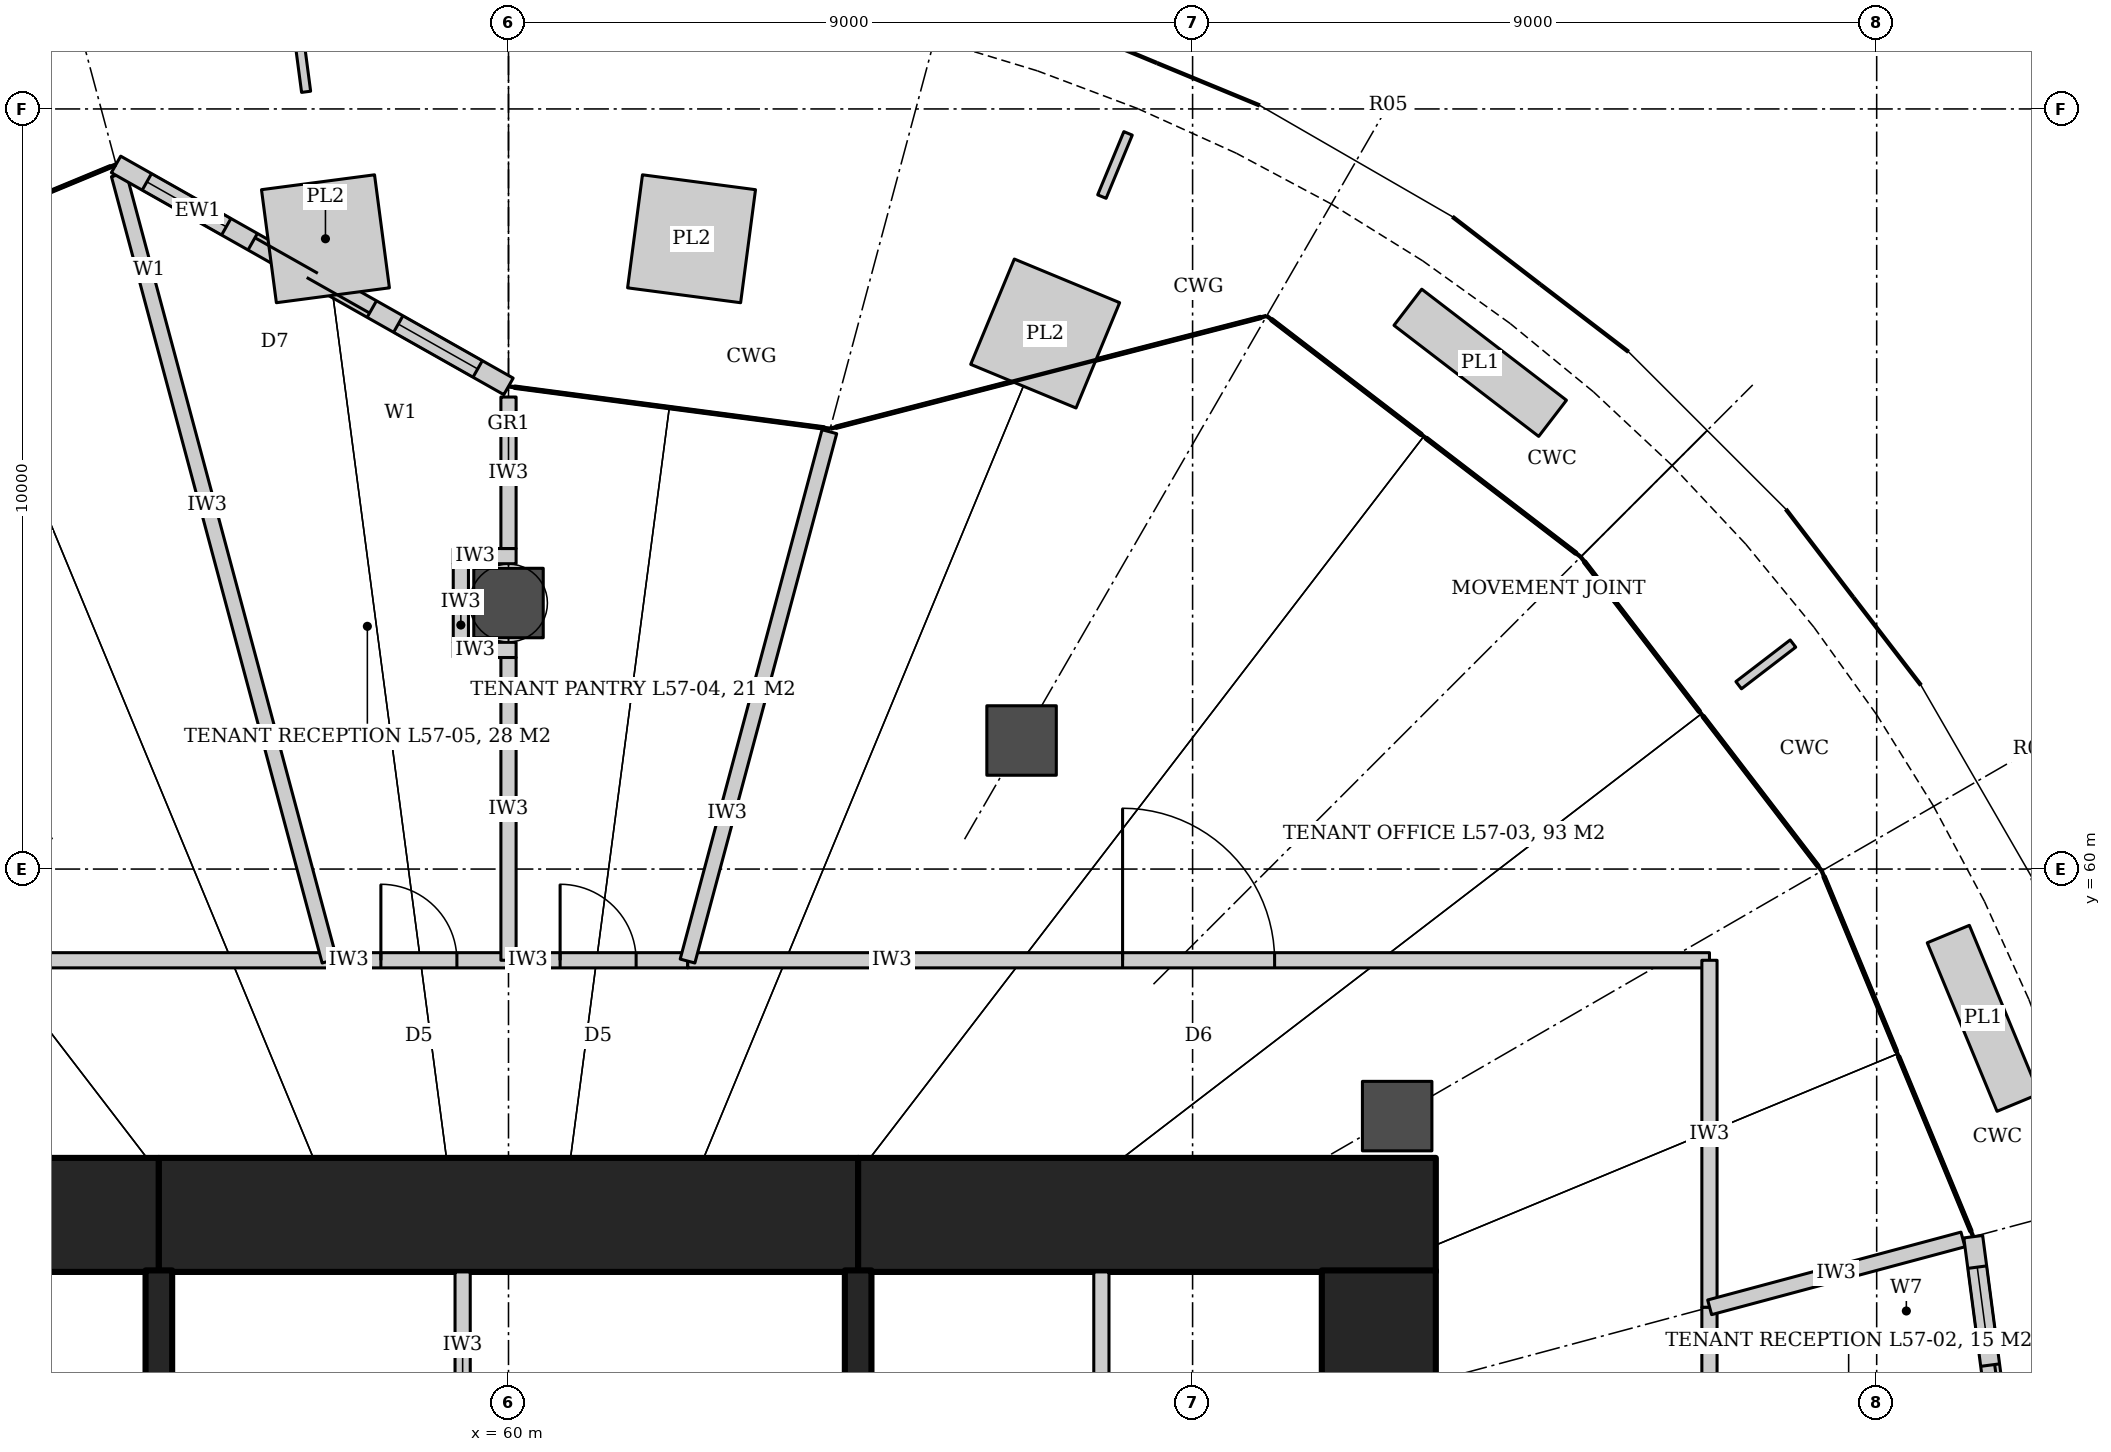
"""IFC4 building model, lengths in metres.
Left out: names, types, materials, properties, quantities, classifications, styles, units other than length and angle.
Written with IfcOpenShell. Run it as: python <this file> out.ifc"""

import sys

from ifc_helpers import new_model, si_unit, direction, frame, frame_2d, origin, origin_2d, place, context, subcontext, project, spatial, rectangle, hollow_circle, extrude, element, fill, save


model = new_model("IFC4")
c1 = context("Model", 3, precision=1e-05, world=origin(), true_north=direction((0.0, 1.0)))
c2 = subcontext(c1, "Body", "Model", "MODEL_VIEW")
j1 = project(units=[si_unit("LENGTHUNIT", "METRE"), si_unit("PLANEANGLEUNIT", "RADIAN")], contexts=[c1])
p1 = place(None, origin())
s1 = spatial("IfcSite", under=j1, at=p1, CompositionType="ELEMENT")
p2 = place(p1, origin())
s2 = spatial("IfcBuilding", under=s1, at=p2, CompositionType="ELEMENT")
p3 = place(p2, frame((0.0, 0.0, 240.2)))
s3 = spatial("IfcBuildingStorey", under=s2, at=p3, CompositionType="ELEMENT", Elevation=240.2)
p4 = place(p3, frame((47.8, 55.45, 0.0), z_axis=(0.0, 0.0, 1.0), x_axis=(1.0, 0.0, 0.0)))
e1 = element("IfcWall", 1, at=p4, inside=s3, PredefinedType="SHEAR", context=c2, shape_type="SweptSolid", body=[
    extrude(rectangle(XDim=7.6, YDim=1.5, at=frame_2d((3.8, 0.0))), origin(), (0.0, 0.0, 1.0), 4.2),
])
p5 = place(p3, frame((55.4, 55.45, 0.0), z_axis=(0.0, 0.0, 1.0), x_axis=(1.0, 0.0, 0.0)))
e2 = element("IfcWall", 2, at=p5, inside=s3, PredefinedType="SHEAR", context=c2, shape_type="SweptSolid", body=[
    extrude(rectangle(XDim=9.2, YDim=1.5, at=frame_2d((4.6, 0.0))), origin(), (0.0, 0.0, 1.0), 4.2),
])
p6 = place(p3, frame((64.6, 55.45, 0.0), z_axis=(0.0, 0.0, 1.0), x_axis=(1.0, 0.0, 0.0)))
e3 = element("IfcWall", 3, at=p6, inside=s3, PredefinedType="SHEAR", context=c2, shape_type="SweptSolid", body=[
    extrude(rectangle(XDim=7.6, YDim=1.5, at=frame_2d((3.8, 0.0))), origin(), (0.0, 0.0, 1.0), 4.2),
])
p7 = place(p3, frame((71.45, 51.5, 0.0), z_axis=(0.0, 0.0, 1.0), x_axis=(0.0, 1.0, 0.0)))
e4 = element("IfcWall", 4, at=p7, inside=s3, PredefinedType="SHEAR", context=c2, shape_type="SweptSolid", body=[
    extrude(rectangle(XDim=3.22, YDim=1.5, at=frame_2d((1.61, 0.0))), origin(), (0.0, 0.0, 1.0), 4.2),
])
for number, where, z_axis, x_axis in (
    (5, (55.4, 51.655, 0.0), (0.0, 0.0, 1.0), (0.0, 1.0, 0.0)),
    (6, (64.6, 51.655, 0.0), (0.0, 0.0, 1.0), (0.0, 1.0, 0.0)),
):
    element("IfcWall", number, at=place(p3, frame(where, z_axis=z_axis, x_axis=x_axis)), inside=s3, PredefinedType="SHEAR", context=c2, shape_type="SweptSolid", body=[
        extrude(rectangle(XDim=3.065, YDim=0.35, at=frame_2d((1.532, 0.0))), origin(), (0.0, 0.0, 1.0), 4.2),
    ])
for number, where, z_axis, x_axis in (
    (7, (71.691, 56.75, 0.0), (0.0, 0.0, 1.0), (1.0, 0.0, 0.0)),
    (8, (66.75, 61.691, 0.0), (0.0, 0.0, 1.0), (1.0, 0.0, 0.0)),
    (9, (60.0, 63.5, 0.0), (0.0, 0.0, 1.0), (1.0, 0.0, 0.0)),
):
    element("IfcColumn", number, at=place(p3, frame(where, z_axis=z_axis, x_axis=x_axis)), inside=s3, PredefinedType="COLUMN", context=c2, shape_type="SweptSolid", body=[
        extrude(hollow_circle(Radius=0.457, WallThickness=0.045, at=origin_2d()), origin(), (0.0, 0.0, 1.0), 4.2),
    ])
p8 = place(p3, frame((44.2, 58.8, 0.0), z_axis=(0.0, 0.0, 1.0), x_axis=(1.0, 0.0, 0.0)))
e10 = element("IfcWall", 10, at=p8, inside=s3, PredefinedType="PARTITIONING", context=c2, shape_type="SweptSolid", body=[
    extrude(rectangle(XDim=13.442, YDim=0.2, at=frame_2d((6.721, 0.0))), origin(), (0.0, 0.0, 1.0), 3.02),
])
p9 = place(p8, frame((5.721, 0.0, 0.0)))
e11 = element("IfcOpeningElement", 11, at=p9, cuts=e10, PredefinedType="OPENING", context=c2, shape_type="SweptSolid", body=[
    extrude(rectangle(XDim=2.0, YDim=2.1, at=frame_2d((1.0, 1.05))), frame((0.0, 0.11, 0.0), z_axis=(0.0, -1.0, 0.0), x_axis=(1.0, 0.0, 0.0)), (0.0, 0.0, 1.0), 0.22),
])
p10 = place(p3, frame((57.642, 58.8, 0.0), z_axis=(0.0, 0.0, 1.0), x_axis=(1.0, 0.0, 0.0)))
e12 = element("IfcWall", 12, at=p10, inside=s3, PredefinedType="PARTITIONING", context=c2, shape_type="SweptSolid", body=[
    extrude(rectangle(XDim=2.358, YDim=0.2, at=frame_2d((1.179, 0.0))), origin(), (0.0, 0.0, 1.0), 3.04),
])
p11 = place(p10, frame((0.679, 0.0, 0.0)))
e13 = element("IfcOpeningElement", 13, at=p11, cuts=e12, PredefinedType="OPENING", context=c2, shape_type="SweptSolid", body=[
    extrude(rectangle(XDim=1.0, YDim=2.1, at=frame_2d((0.5, 1.05))), frame((0.0, 0.11, 0.0), z_axis=(0.0, -1.0, 0.0), x_axis=(1.0, 0.0, 0.0)), (0.0, 0.0, 1.0), 0.22),
])
p12 = place(p3, frame((60.0, 58.8, 0.0), z_axis=(0.0, 0.0, 1.0), x_axis=(1.0, 0.0, 0.0)))
e14 = element("IfcWall", 14, at=p12, inside=s3, PredefinedType="PARTITIONING", context=c2, shape_type="SweptSolid", body=[
    extrude(rectangle(XDim=2.358, YDim=0.2, at=frame_2d((1.179, 0.0))), origin(), (0.0, 0.0, 1.0), 3.04),
])
p13 = place(p12, frame((0.679, 0.0, 0.0)))
e15 = element("IfcOpeningElement", 15, at=p13, cuts=e14, PredefinedType="OPENING", context=c2, shape_type="SweptSolid", body=[
    extrude(rectangle(XDim=1.0, YDim=2.1, at=frame_2d((0.5, 1.05))), frame((0.0, 0.11, 0.0), z_axis=(0.0, -1.0, 0.0), x_axis=(1.0, 0.0, 0.0)), (0.0, 0.0, 1.0), 0.22),
])
p14 = place(p3, frame((62.358, 58.8, 0.0), z_axis=(0.0, 0.0, 1.0), x_axis=(1.0, 0.0, 0.0)))
e16 = element("IfcWall", 16, at=p14, inside=s3, PredefinedType="PARTITIONING", context=c2, shape_type="SweptSolid", body=[
    extrude(rectangle(XDim=13.442, YDim=0.2, at=frame_2d((6.721, 0.0))), origin(), (0.0, 0.0, 1.0), 3.02),
])
p15 = place(p14, frame((5.721, 0.0, 0.0)))
e17 = element("IfcOpeningElement", 17, at=p15, cuts=e16, PredefinedType="OPENING", context=c2, shape_type="SweptSolid", body=[
    extrude(rectangle(XDim=2.0, YDim=2.1, at=frame_2d((1.0, 1.05))), frame((0.0, 0.11, 0.0), z_axis=(0.0, -1.0, 0.0), x_axis=(1.0, 0.0, 0.0)), (0.0, 0.0, 1.0), 0.22),
])
p16 = place(p3, frame((75.8, 58.8, 0.0), z_axis=(0.0, 0.0, 1.0), x_axis=(0.0, -1.0, 0.0)))
e18 = element("IfcWall", 18, at=p16, inside=s3, PredefinedType="PARTITIONING", context=c2, shape_type="SweptSolid", body=[
    extrude(rectangle(XDim=4.566, YDim=0.2, at=frame_2d((2.283, 0.0))), origin(), (0.0, 0.0, 1.0), 3.02),
])
p17 = place(p3, frame((75.8, 54.234, 0.0), z_axis=(0.0, 0.0, 1.0), x_axis=(0.0, -1.0, 0.0)))
e19 = element("IfcWall", 19, at=p17, inside=s3, PredefinedType="PARTITIONING", context=c2, shape_type="SweptSolid", body=[
    extrude(rectangle(XDim=4.234, YDim=0.2, at=frame_2d((2.117, 0.0))), origin(), (0.0, 0.0, 1.0), 3.02),
])
p18 = place(p17, frame((1.317, 0.0, 0.0)))
e20 = element("IfcOpeningElement", 20, at=p18, cuts=e19, PredefinedType="OPENING", context=c2, shape_type="SweptSolid", body=[
    extrude(rectangle(XDim=1.6, YDim=2.4, at=frame_2d((0.8, 1.2))), frame((0.0, 0.11, 0.0), z_axis=(0.0, -1.0, 0.0), x_axis=(1.0, 0.0, 0.0)), (0.0, 0.0, 1.0), 0.22),
])
p19 = place(p3, frame((75.802, 54.234, 0.0), z_axis=(0.0, 0.0, 1.0), x_axis=(0.965944651358, 0.258748778768, 0.0)))
e21 = element("IfcWall", 21, at=p19, inside=s3, PredefinedType="PARTITIONING", context=c2, shape_type="SweptSolid", body=[
    extrude(rectangle(XDim=3.525, YDim=0.2, at=frame_2d((1.763, 0.0))), origin(), (0.0, 0.0, 1.0), 3.02),
])
p20 = place(p3, frame((62.355, 58.79, 0.0), z_axis=(0.0, 0.0, 1.0), x_axis=(0.25882950996, 0.965923022178, 0.0)))
e22 = element("IfcWall", 22, at=p20, inside=s3, PredefinedType="PARTITIONING", context=c2, shape_type="SweptSolid", body=[
    extrude(rectangle(XDim=10.885, YDim=0.2, at=frame_2d((5.442, 0.0))), origin(), (0.0, 0.0, 1.0), 3.02),
])
for number, where, z_axis, x_axis in (
    (23, (60.1, 62.883, 0.0), (0.0, 0.0, 1.0), (-1.0, 0.0, 0.0)),
    (24, (60.1, 64.117, 0.0), (0.0, 0.0, 1.0), (-1.0, 0.0, 0.0)),
):
    element("IfcWall", number, at=place(p3, frame(where, z_axis=z_axis, x_axis=x_axis)), inside=s3, PredefinedType="PARTITIONING", context=c2, shape_type="SweptSolid", body=[
        extrude(rectangle(XDim=0.827, YDim=0.2, at=frame_2d((0.414, 0.0))), origin(), (0.0, 0.0, 1.0), 3.02),
    ])
p21 = place(p3, frame((59.373, 62.983, 0.0), z_axis=(0.0, 0.0, 1.0), x_axis=(0.0, 1.0, 0.0)))
e25 = element("IfcWall", 25, at=p21, inside=s3, PredefinedType="PARTITIONING", context=c2, shape_type="SweptSolid", body=[
    extrude(rectangle(XDim=1.034, YDim=0.2, at=frame_2d((0.517, 0.0))), origin(), (0.0, 0.0, 1.0), 3.02),
])
p22 = place(p3, frame((60.0, 58.8, 0.0), z_axis=(0.0, 0.0, 1.0), x_axis=(0.0, 1.0, 0.0)))
e26 = element("IfcWall", 26, at=p22, inside=s3, PredefinedType="PARTITIONING", context=c2, shape_type="SweptSolid", body=[
    extrude(rectangle(XDim=3.983, YDim=0.2, at=frame_2d((1.991, 0.0))), origin(), (0.0, 0.0, 1.0), 3.04),
])
p23 = place(p3, frame((60.0, 64.217, 0.0), z_axis=(0.0, 0.0, 1.0), x_axis=(0.0, 1.0, 0.0)))
e27 = element("IfcWall", 27, at=p23, inside=s3, PredefinedType="PARTITIONING", context=c2, shape_type="SweptSolid", body=[
    extrude(rectangle(XDim=5.668, YDim=0.2, at=frame_2d((2.834, 0.0))), origin(), (0.0, 0.0, 1.0), 3.02),
])
p24 = place(p3, frame((57.645, 58.79, 0.0), z_axis=(0.0, 0.0, 1.0), x_axis=(-0.25880510588, 0.965929561185, 0.0)))
e28 = element("IfcWall", 28, at=p24, inside=s3, PredefinedType="PARTITIONING", context=c2, shape_type="SweptSolid", body=[
    extrude(rectangle(XDim=10.785, YDim=0.2, at=frame_2d((5.393, 0.0))), origin(), (0.0, 0.0, 1.0), 3.02),
])
p25 = place(p3, frame((80.025, 50.0, 0.0), z_axis=(0.0, 0.0, 1.0), x_axis=(-0.130487131216, 0.99145000307, 0.0)))
e29 = element("IfcWall", 29, at=p25, inside=s3, PredefinedType="SOLIDWALL", context=c2, shape_type="SweptSolid", body=[
    extrude(rectangle(XDim=5.228, YDim=0.25, at=frame_2d((2.614, 0.0))), origin(), (0.0, 0.0, 1.0), 4.04),
])
p26 = place(p25, frame((1.714, 0.0, 0.0)))
e30 = element("IfcOpeningElement", 30, at=p26, cuts=e29, PredefinedType="OPENING", context=c2, shape_type="SweptSolid", body=[
    extrude(rectangle(XDim=1.8, YDim=2.4, at=frame_2d((0.9, 1.2))), frame((0.0, 0.135, 0.0), z_axis=(0.0, -1.0, 0.0), x_axis=(1.0, 0.0, 0.0)), (0.0, 0.0, 1.0), 0.27),
])
p27 = place(p25, frame((0.414, 0.0, 0.0)))
e31 = element("IfcOpeningElement", 31, at=p27, cuts=e29, PredefinedType="OPENING", context=c2, shape_type="SweptSolid", body=[
    extrude(rectangle(XDim=0.9, YDim=2.4, at=frame_2d((0.45, 1.2))), frame((0.0, 0.135, 0.0), z_axis=(0.0, -1.0, 0.0), x_axis=(1.0, 0.0, 0.0)), (0.0, 0.0, 1.0), 0.27),
])
p28 = place(p25, frame((3.914, 0.0, 0.0)))
e32 = element("IfcOpeningElement", 32, at=p28, cuts=e29, PredefinedType="OPENING", context=c2, shape_type="SweptSolid", body=[
    extrude(rectangle(XDim=0.9, YDim=2.4, at=frame_2d((0.45, 1.2))), frame((0.0, 0.135, 0.0), z_axis=(0.0, -1.0, 0.0), x_axis=(1.0, 0.0, 0.0)), (0.0, 0.0, 1.0), 0.27),
])
p29 = place(p3, frame((60.0, 70.025, 0.0), z_axis=(0.0, 0.0, 1.0), x_axis=(-0.99145000307, -0.130487131216, 0.0)))
e33 = element("IfcWall", 33, at=p29, inside=s3, PredefinedType="SOLIDWALL", context=c2, shape_type="SweptSolid", body=[
    extrude(rectangle(XDim=5.228, YDim=0.25, at=frame_2d((2.614, 0.0))), origin(), (0.0, 0.0, 1.0), 4.04),
])
p30 = place(p29, frame((1.714, 0.0, 0.0)))
e34 = element("IfcOpeningElement", 34, at=p30, cuts=e33, PredefinedType="OPENING", context=c2, shape_type="SweptSolid", body=[
    extrude(rectangle(XDim=1.8, YDim=2.4, at=frame_2d((0.9, 1.2))), frame((0.0, 0.135, 0.0), z_axis=(0.0, -1.0, 0.0), x_axis=(1.0, 0.0, 0.0)), (0.0, 0.0, 1.0), 0.27),
])
p31 = place(p29, frame((0.414, 0.0, 0.0)))
e35 = element("IfcOpeningElement", 35, at=p31, cuts=e33, PredefinedType="OPENING", context=c2, shape_type="SweptSolid", body=[
    extrude(rectangle(XDim=0.9, YDim=2.4, at=frame_2d((0.45, 1.2))), frame((0.0, 0.135, 0.0), z_axis=(0.0, -1.0, 0.0), x_axis=(1.0, 0.0, 0.0)), (0.0, 0.0, 1.0), 0.27),
])
p32 = place(p29, frame((3.914, 0.0, 0.0)))
e36 = element("IfcOpeningElement", 36, at=p32, cuts=e33, PredefinedType="OPENING", context=c2, shape_type="SweptSolid", body=[
    extrude(rectangle(XDim=0.9, YDim=2.4, at=frame_2d((0.45, 1.2))), frame((0.0, 0.135, 0.0), z_axis=(0.0, -1.0, 0.0), x_axis=(1.0, 0.0, 0.0)), (0.0, 0.0, 1.0), 0.27),
])
p33 = place(p3, frame((67.8, 51.675, 0.0), z_axis=(0.0, 0.0, 1.0), x_axis=(0.0, 1.0, 0.0)))
e37 = element("IfcWall", 37, at=p33, inside=s3, PredefinedType="PARTITIONING", context=c2, shape_type="SweptSolid", body=[
    extrude(rectangle(XDim=3.025, YDim=0.2, at=frame_2d((1.512, 0.0))), origin(), (0.0, 0.0, 1.0), 4.2),
])
p34 = place(p3, frame((59.396, 51.675, 0.0), z_axis=(0.0, 0.0, 1.0), x_axis=(0.0, 1.0, 0.0)))
e38 = element("IfcWall", 38, at=p34, inside=s3, PredefinedType="PARTITIONING", context=c2, shape_type="SweptSolid", body=[
    extrude(rectangle(XDim=3.025, YDim=0.2, at=frame_2d((1.512, 0.0))), origin(), (0.0, 0.0, 1.0), 4.04),
])
p35 = place(p15, origin())
e39 = element("IfcDoor", 39, at=p35, inside=s3, OperationType="DOUBLE_DOOR_DOUBLE_SWING", PredefinedType="DOOR", context=c2, shape_type="SweptSolid", body=[
    extrude(rectangle(XDim=2.0, YDim=2.1, at=frame_2d((1.0, 1.05))), frame((0.0, 0.025, 0.0), z_axis=(0.0, -1.0, 0.0), x_axis=(1.0, 0.0, 0.0)), (0.0, 0.0, 1.0), 0.05),
])
fill(e17, e39)
p36 = place(p13, origin())
e40 = element("IfcDoor", 40, at=p36, inside=s3, OperationType="SINGLE_SWING_LEFT", PredefinedType="DOOR", context=c2, shape_type="SweptSolid", body=[
    extrude(rectangle(XDim=1.0, YDim=2.1, at=frame_2d((0.5, 1.05))), frame((0.0, 0.025, 0.0), z_axis=(0.0, -1.0, 0.0), x_axis=(1.0, 0.0, 0.0)), (0.0, 0.0, 1.0), 0.05),
])
fill(e15, e40)
p37 = place(p11, origin())
e41 = element("IfcDoor", 41, at=p37, inside=s3, OperationType="SINGLE_SWING_LEFT", PredefinedType="DOOR", context=c2, shape_type="SweptSolid", body=[
    extrude(rectangle(XDim=1.0, YDim=2.1, at=frame_2d((0.5, 1.05))), frame((0.0, 0.025, 0.0), z_axis=(0.0, -1.0, 0.0), x_axis=(1.0, 0.0, 0.0)), (0.0, 0.0, 1.0), 0.05),
])
fill(e13, e41)
p38 = place(p26, origin())
e42 = element("IfcDoor", 42, at=p38, inside=s3, OperationType="DOUBLE_DOOR_SLIDING", PredefinedType="DOOR", context=c2, shape_type="SweptSolid", body=[
    extrude(rectangle(XDim=1.8, YDim=2.4, at=frame_2d((0.9, 1.2))), frame((0.0, 0.025, 0.0), z_axis=(0.0, -1.0, 0.0), x_axis=(1.0, 0.0, 0.0)), (0.0, 0.0, 1.0), 0.05),
])
fill(e30, e42)
p39 = place(p28, origin())
e43 = element("IfcWindow", 43, at=p39, inside=s3, PartitioningType="SINGLE_PANEL", PredefinedType="WINDOW", context=c2, shape_type="SweptSolid", body=[
    extrude(rectangle(XDim=0.9, YDim=2.4, at=frame_2d((0.45, 1.2))), frame((0.0, 0.03, 0.0), z_axis=(0.0, -1.0, 0.0), x_axis=(1.0, 0.0, 0.0)), (0.0, 0.0, 1.0), 0.06),
])
fill(e32, e43)
p40 = place(p30, origin())
e44 = element("IfcDoor", 44, at=p40, inside=s3, OperationType="DOUBLE_DOOR_SLIDING", PredefinedType="DOOR", context=c2, shape_type="SweptSolid", body=[
    extrude(rectangle(XDim=1.8, YDim=2.4, at=frame_2d((0.9, 1.2))), frame((0.0, 0.025, 0.0), z_axis=(0.0, -1.0, 0.0), x_axis=(1.0, 0.0, 0.0)), (0.0, 0.0, 1.0), 0.05),
])
fill(e34, e44)
p41 = place(p31, origin())
e45 = element("IfcWindow", 45, at=p41, inside=s3, PartitioningType="SINGLE_PANEL", PredefinedType="WINDOW", context=c2, shape_type="SweptSolid", body=[
    extrude(rectangle(XDim=0.9, YDim=2.4, at=frame_2d((0.45, 1.2))), frame((0.0, 0.03, 0.0), z_axis=(0.0, -1.0, 0.0), x_axis=(1.0, 0.0, 0.0)), (0.0, 0.0, 1.0), 0.06),
])
fill(e35, e45)
p42 = place(p32, origin())
e46 = element("IfcWindow", 46, at=p42, inside=s3, PartitioningType="SINGLE_PANEL", PredefinedType="WINDOW", context=c2, shape_type="SweptSolid", body=[
    extrude(rectangle(XDim=0.9, YDim=2.4, at=frame_2d((0.45, 1.2))), frame((0.0, 0.03, 0.0), z_axis=(0.0, -1.0, 0.0), x_axis=(1.0, 0.0, 0.0)), (0.0, 0.0, 1.0), 0.06),
])
fill(e36, e46)
save(model, sys.argv[1])
